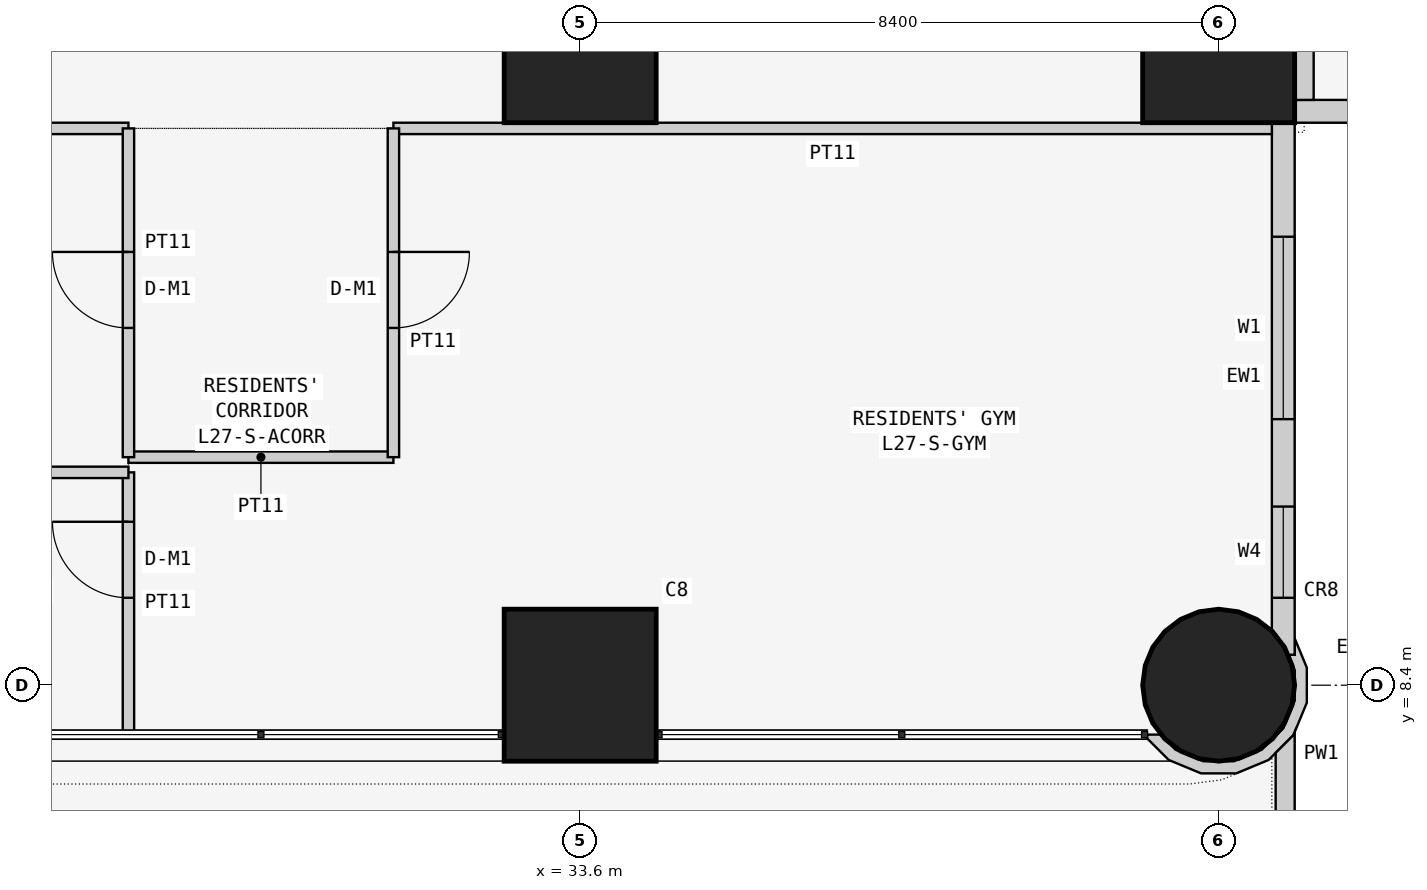
"""IFC4 building model, lengths in metres.
Left out: names, types, materials, properties, quantities, classifications, styles, units other than length and angle.
Written with IfcOpenShell. Run it as: python <this file> out.ifc"""

import sys

from ifc_helpers import new_model, si_unit, direction, frame, frame_2d, origin, origin_2d, place, context, subcontext, project, spatial, polyline, rectangle, circle, outline, extrude, element, fill, save


model = new_model("IFC4")
c1 = context("Model", 3, precision=1e-05, world=origin(), true_north=direction((0.0, 1.0)))
c2 = subcontext(c1, "Body", "Model", "MODEL_VIEW")
j1 = project(units=[si_unit("LENGTHUNIT", "METRE"), si_unit("PLANEANGLEUNIT", "RADIAN")], contexts=[c1])
p1 = place(None, origin())
s1 = spatial("IfcSite", under=j1, at=p1, CompositionType="ELEMENT")
p2 = place(p1, origin())
s2 = spatial("IfcBuilding", under=s1, at=p2, CompositionType="ELEMENT")
p3 = place(p2, frame((0.0, 0.0, 108.9)))
s3 = spatial("IfcBuildingStorey", under=s2, at=p3, CompositionType="ELEMENT", Elevation=108.9)
for number, where, z_axis, x_axis in (
    (1, (33.6, 8.4, 0.0), (0.0, 0.0, 1.0), (1.0, 0.0, 0.0)),
    (2, (33.6, 16.8, 0.0), (0.0, 0.0, 1.0), (1.0, 0.0, 0.0)),
):
    element("IfcColumn", number, at=place(p3, frame(where, z_axis=z_axis, x_axis=x_axis)), inside=s3, PredefinedType="COLUMN", context=c2, shape_type="SweptSolid", body=[
        extrude(rectangle(XDim=2.0, YDim=2.0, at=origin_2d()), origin(), (0.0, 0.0, 1.0), 3.6),
    ])
p4 = place(p3, frame((42.0, 8.4, 0.0), z_axis=(0.0, 0.0, 1.0), x_axis=(1.0, 0.0, 0.0)))
e3 = element("IfcColumn", 3, at=p4, inside=s3, PredefinedType="COLUMN", context=c2, shape_type="SweptSolid", body=[
    extrude(circle(Radius=1.0, at=origin_2d()), origin(), (0.0, 0.0, 1.0), 3.6),
])
p5 = place(p3, frame((42.0, 16.8, 0.0), z_axis=(0.0, 0.0, 1.0), x_axis=(1.0, 0.0, 0.0)))
e4 = element("IfcColumn", 4, at=p5, inside=s3, PredefinedType="COLUMN", context=c2, shape_type="SweptSolid", body=[
    extrude(rectangle(XDim=2.0, YDim=2.0, at=origin_2d()), origin(), (0.0, 0.0, 1.0), 3.6),
])
p6 = place(p3, frame((42.85, 8.8, 0.0), z_axis=(0.0, 0.0, 1.0), x_axis=(0.0, 1.0, 0.0)))
e5 = element("IfcWall", 5, at=p6, inside=s3, PredefinedType="SOLIDWALL", context=c2, shape_type="SweptSolid", body=[
    extrude(rectangle(XDim=7.3, YDim=0.3, at=frame_2d((3.65, 0.0))), origin(), (0.0, 0.0, 1.0), 3.45),
])
p7 = place(p6, frame((3.1, 0.0, 0.9)))
e6 = element("IfcOpeningElement", 6, at=p7, cuts=e5, PredefinedType="OPENING", context=c2, shape_type="SweptSolid", body=[
    extrude(rectangle(XDim=2.4, YDim=1.5, at=frame_2d((1.2, 0.75))), frame((0.0, 0.16, 0.0), z_axis=(0.0, -1.0, 0.0), x_axis=(1.0, 0.0, 0.0)), (0.0, 0.0, 1.0), 0.32),
])
p8 = place(p6, frame((0.75, 0.0, 0.9)))
e7 = element("IfcOpeningElement", 7, at=p8, cuts=e5, PredefinedType="OPENING", context=c2, shape_type="SweptSolid", body=[
    extrude(rectangle(XDim=1.2, YDim=1.5, at=frame_2d((0.6, 0.75))), frame((0.0, 0.16, 0.0), z_axis=(0.0, -1.0, 0.0), x_axis=(1.0, 0.0, 0.0)), (0.0, 0.0, 1.0), 0.32),
])
p9 = place(p3, frame((43.0, 15.95, 0.0), z_axis=(0.0, 0.0, 1.0), x_axis=(1.0, 0.0, 0.0)))
e8 = element("IfcWall", 8, at=p9, inside=s3, PredefinedType="SOLIDWALL", context=c2, shape_type="SweptSolid", body=[
    extrude(rectangle(XDim=15.4, YDim=0.3, at=frame_2d((7.7, 0.0))), origin(), (0.0, 0.0, 1.0), 3.45),
])
p10 = place(p9, frame((1.2, 0.0, 0.9)))
e9 = element("IfcOpeningElement", 9, at=p10, cuts=e8, PredefinedType="OPENING", context=c2, shape_type="SweptSolid", body=[
    extrude(rectangle(XDim=1.8, YDim=1.5, at=frame_2d((0.9, 0.75))), frame((0.0, 0.16, 0.0), z_axis=(0.0, -1.0, 0.0), x_axis=(1.0, 0.0, 0.0)), (0.0, 0.0, 1.0), 0.32),
])
p11 = place(p9, frame((4.95, 0.0, 1.5)))
e10 = element("IfcOpeningElement", 10, at=p11, cuts=e8, PredefinedType="OPENING", context=c2, shape_type="SweptSolid", body=[
    extrude(rectangle(XDim=0.9, YDim=0.7, at=frame_2d((0.45, 0.35))), frame((0.0, 0.16, 0.0), z_axis=(0.0, -1.0, 0.0), x_axis=(1.0, 0.0, 0.0)), (0.0, 0.0, 1.0), 0.32),
])
p12 = place(p9, frame((8.5, 0.0, 0.9)))
e11 = element("IfcOpeningElement", 11, at=p12, cuts=e8, PredefinedType="OPENING", context=c2, shape_type="SweptSolid", body=[
    extrude(rectangle(XDim=1.8, YDim=1.5, at=frame_2d((0.9, 0.75))), frame((0.0, 0.16, 0.0), z_axis=(0.0, -1.0, 0.0), x_axis=(1.0, 0.0, 0.0)), (0.0, 0.0, 1.0), 0.32),
])
p13 = place(p9, frame((12.5, 0.0, 0.0)))
e12 = element("IfcOpeningElement", 12, at=p13, cuts=e8, PredefinedType="OPENING", context=c2, shape_type="SweptSolid", body=[
    extrude(rectangle(XDim=0.9, YDim=2.4, at=frame_2d((0.45, 1.2))), frame((0.0, 0.16, 0.0), z_axis=(0.0, -1.0, 0.0), x_axis=(1.0, 0.0, 0.0)), (0.0, 0.0, 1.0), 0.32),
])
p14 = place(p9, frame((13.5, 0.0, 0.9)))
e13 = element("IfcOpeningElement", 13, at=p14, cuts=e8, PredefinedType="OPENING", context=c2, shape_type="SweptSolid", body=[
    extrude(rectangle(XDim=1.2, YDim=1.5, at=frame_2d((0.6, 0.75))), frame((0.0, 0.16, 0.0), z_axis=(0.0, -1.0, 0.0), x_axis=(1.0, 0.0, 0.0)), (0.0, 0.0, 1.0), 0.32),
])
p15 = place(p3, frame((41.132, 7.757, 0.0), z_axis=(0.0, 0.0, 1.0), x_axis=(0.555974394895, -0.831199417842, 0.0)))
e14 = element("IfcWall", 14, at=p15, inside=s3, PredefinedType="SOLIDWALL", context=c2, shape_type="SweptSolid", body=[
    extrude(outline(polyline([(0.171, 2.132), (0.113, 2.066), (0.339, 2.021), (0.67, 1.8), (0.891, 1.469), (0.968, 1.078), (0.89, 0.688), (0.669, 0.357), (0.338, 0.136), (0.062, 0.081), (-0.036, -0.066), (0.005, -0.093), (0.4, -0.014), (0.784, 0.242), (1.04, 0.626), (1.13, 1.078), (1.041, 1.531), (0.784, 1.915), (0.401, 2.171), (-0.009, 2.253), (0.171, 2.132)])), origin(), (0.0, 0.0, 1.0), 3.45),
])
p16 = place(p3, origin())
e15 = element("IfcWall", 15, at=p16, inside=s3, PredefinedType="PARAPET", context=c2, shape_type="SweptSolid", body=[
    extrude(outline(polyline([(42.812, -0.3), (42.59, -0.59), (42.3, -0.812), (41.962, -0.952), (41.6, -1.0), (17.2, -1.0), (16.838, -0.952), (16.5, -0.812), (16.21, -0.59), (15.988, -0.3), (15.848, 0.038), (15.8, 0.4), (15.8, 7.783), (15.817, 7.743), (16.05, 7.51), (16.05, 0.417), (16.091, 0.103), (16.206, -0.174), (16.388, -0.412), (16.626, -0.594), (16.903, -0.709), (17.216, -0.75), (41.583, -0.75), (41.897, -0.709), (42.174, -0.594), (42.412, -0.412), (42.594, -0.174), (42.709, 0.103), (42.75, 0.417), (42.75, 7.51), (42.983, 7.743), (43.0, 7.783), (43.0, 0.4), (42.952, 0.038), (42.812, -0.3)])), origin(), (0.0, 0.0, 1.0), 1.25),
])
p17 = place(p3, origin())
e16 = element("IfcWall", 16, at=p17, inside=s3, PredefinedType="PARAPET", context=c2, shape_type="SweptSolid", body=[
    extrude(outline(polyline([(42.812, 8.1), (42.946, 8.423), (43.0, 8.423), (43.0, 8.198), (42.849, 7.833), (42.74, 7.724), (42.74, 8.006), (42.812, 8.1)])), origin(), (0.0, 0.0, 1.0), 1.25),
])
p18 = place(p3, frame((43.125, 22.971, 0.0), z_axis=(0.0, 0.0, 1.0), x_axis=(0.0, -1.0, 0.0)))
e17 = element("IfcWall", 17, at=p18, inside=s3, PredefinedType="PARTITIONING", context=c2, shape_type="SweptSolid", body=[
    extrude(rectangle(XDim=6.871, YDim=0.25, at=frame_2d((3.436, 0.0))), origin(), (0.0, 0.0, 1.0), 3.45),
])
for number, where, z_axis, x_axis in (
    (18, (42.7, 15.725, 0.0), (0.0, 0.0, 1.0), (-1.0, 0.0, 0.0)),
    (19, (27.657, 15.725, 0.0), (0.0, 0.0, 1.0), (-1.0, 0.0, 0.0)),
):
    element("IfcWall", number, at=place(p3, frame(where, z_axis=z_axis, x_axis=x_axis)), inside=s3, PredefinedType="PARTITIONING", context=c2, shape_type="SweptSolid", body=[
        extrude(rectangle(XDim=11.557, YDim=0.15, at=frame_2d((5.778, 0.0))), origin(), (0.0, 0.0, 1.0), 3.45),
    ])
p19 = place(p3, frame((27.657, 11.4, 0.0), z_axis=(0.0, 0.0, 1.0), x_axis=(1.0, 0.0, 0.0)))
e20 = element("IfcWall", 20, at=p19, inside=s3, PredefinedType="PARTITIONING", context=c2, shape_type="SweptSolid", body=[
    extrude(rectangle(XDim=3.486, YDim=0.15, at=frame_2d((1.743, 0.0))), origin(), (0.0, 0.0, 1.0), 3.45),
])
p20 = place(p3, frame((31.143, 11.4, 0.0), z_axis=(0.0, 0.0, 1.0), x_axis=(0.0, 1.0, 0.0)))
e21 = element("IfcWall", 21, at=p20, inside=s3, PredefinedType="PARTITIONING", context=c2, shape_type="SweptSolid", body=[
    extrude(rectangle(XDim=4.325, YDim=0.15, at=frame_2d((2.163, 0.0))), origin(), (0.0, 0.0, 1.0), 3.45),
])
p21 = place(p20, frame((1.7, 0.0, 0.0)))
e22 = element("IfcOpeningElement", 22, at=p21, cuts=e21, PredefinedType="OPENING", context=c2, shape_type="SweptSolid", body=[
    extrude(rectangle(XDim=1.0, YDim=2.1, at=frame_2d((0.5, 1.05))), frame((0.0, 0.085, 0.0), z_axis=(0.0, -1.0, 0.0), x_axis=(1.0, 0.0, 0.0)), (0.0, 0.0, 1.0), 0.17),
])
p22 = place(p3, frame((27.657, 15.725, 0.0), z_axis=(0.0, 0.0, 1.0), x_axis=(0.0, -1.0, 0.0)))
e23 = element("IfcWall", 23, at=p22, inside=s3, PredefinedType="PARTITIONING", context=c2, shape_type="SweptSolid", body=[
    extrude(rectangle(XDim=4.325, YDim=0.15, at=frame_2d((2.163, 0.0))), origin(), (0.0, 0.0, 1.0), 3.45),
])
p23 = place(p22, frame((1.625, 0.0, 0.0)))
e24 = element("IfcOpeningElement", 24, at=p23, cuts=e23, PredefinedType="OPENING", context=c2, shape_type="SweptSolid", body=[
    extrude(rectangle(XDim=1.0, YDim=2.1, at=frame_2d((0.5, 1.05))), frame((0.0, 0.085, 0.0), z_axis=(0.0, -1.0, 0.0), x_axis=(1.0, 0.0, 0.0)), (0.0, 0.0, 1.0), 0.17),
])
p24 = place(p3, frame((27.657, 7.75, 0.0), z_axis=(0.0, 0.0, 1.0), x_axis=(0.0, 1.0, 0.0)))
e25 = element("IfcWall", 25, at=p24, inside=s3, PredefinedType="PARTITIONING", context=c2, shape_type="SweptSolid", body=[
    extrude(rectangle(XDim=3.45, YDim=0.15, at=frame_2d((1.725, 0.0))), origin(), (0.0, 0.0, 1.0), 3.45),
])
p25 = place(p24, frame((1.8, 0.0, 0.0)))
e26 = element("IfcOpeningElement", 26, at=p25, cuts=e25, PredefinedType="OPENING", context=c2, shape_type="SweptSolid", body=[
    extrude(rectangle(XDim=1.0, YDim=2.1, at=frame_2d((0.5, 1.05))), frame((0.0, 0.085, 0.0), z_axis=(0.0, -1.0, 0.0), x_axis=(1.0, 0.0, 0.0)), (0.0, 0.0, 1.0), 0.17),
])
p26 = place(p3, frame((16.1, 11.2, 0.0), z_axis=(0.0, 0.0, 1.0), x_axis=(1.0, 0.0, 0.0)))
e27 = element("IfcWall", 27, at=p26, inside=s3, PredefinedType="PARTITIONING", context=c2, shape_type="SweptSolid", body=[
    extrude(rectangle(XDim=11.557, YDim=0.15, at=frame_2d((5.778, 0.0))), origin(), (0.0, 0.0, 1.0), 3.45),
])
p27 = place(p7, origin())
e28 = element("IfcWindow", 28, at=p27, inside=s3, PartitioningType="SINGLE_PANEL", PredefinedType="WINDOW", context=c2, shape_type="SweptSolid", body=[
    extrude(rectangle(XDim=2.4, YDim=1.5, at=frame_2d((1.2, 0.75))), frame((0.0, 0.03, 0.0), z_axis=(0.0, -1.0, 0.0), x_axis=(1.0, 0.0, 0.0)), (0.0, 0.0, 1.0), 0.06),
])
fill(e6, e28)
p28 = place(p8, origin())
e29 = element("IfcWindow", 29, at=p28, inside=s3, PartitioningType="SINGLE_PANEL", PredefinedType="WINDOW", context=c2, shape_type="SweptSolid", body=[
    extrude(rectangle(XDim=1.2, YDim=1.5, at=frame_2d((0.6, 0.75))), frame((0.0, 0.03, 0.0), z_axis=(0.0, -1.0, 0.0), x_axis=(1.0, 0.0, 0.0)), (0.0, 0.0, 1.0), 0.06),
])
fill(e7, e29)
p29 = place(p21, frame((1.0, 0.0, 0.0), z_axis=(0.0, 0.0, 1.0), x_axis=(-1.0, 0.0, 0.0)))
e30 = element("IfcDoor", 30, at=p29, inside=s3, OperationType="SINGLE_SWING_LEFT", PredefinedType="DOOR", context=c2, shape_type="SweptSolid", body=[
    extrude(rectangle(XDim=1.0, YDim=2.1, at=frame_2d((0.5, 1.05))), frame((0.0, 0.025, 0.0), z_axis=(0.0, -1.0, 0.0), x_axis=(1.0, 0.0, 0.0)), (0.0, 0.0, 1.0), 0.05),
])
fill(e22, e30)
p30 = place(p23, frame((1.0, 0.0, 0.0), z_axis=(0.0, 0.0, 1.0), x_axis=(-1.0, 0.0, 0.0)))
e31 = element("IfcDoor", 31, at=p30, inside=s3, OperationType="SINGLE_SWING_RIGHT", PredefinedType="DOOR", context=c2, shape_type="SweptSolid", body=[
    extrude(rectangle(XDim=1.0, YDim=2.1, at=frame_2d((0.5, 1.05))), frame((0.0, 0.025, 0.0), z_axis=(0.0, -1.0, 0.0), x_axis=(1.0, 0.0, 0.0)), (0.0, 0.0, 1.0), 0.05),
])
fill(e24, e31)
p31 = place(p25, origin())
e32 = element("IfcDoor", 32, at=p31, inside=s3, OperationType="SINGLE_SWING_RIGHT", PredefinedType="DOOR", context=c2, shape_type="SweptSolid", body=[
    extrude(rectangle(XDim=1.0, YDim=2.1, at=frame_2d((0.5, 1.05))), frame((0.0, 0.025, 0.0), z_axis=(0.0, -1.0, 0.0), x_axis=(1.0, 0.0, 0.0)), (0.0, 0.0, 1.0), 0.05),
])
fill(e26, e32)
save(model, sys.argv[1])
